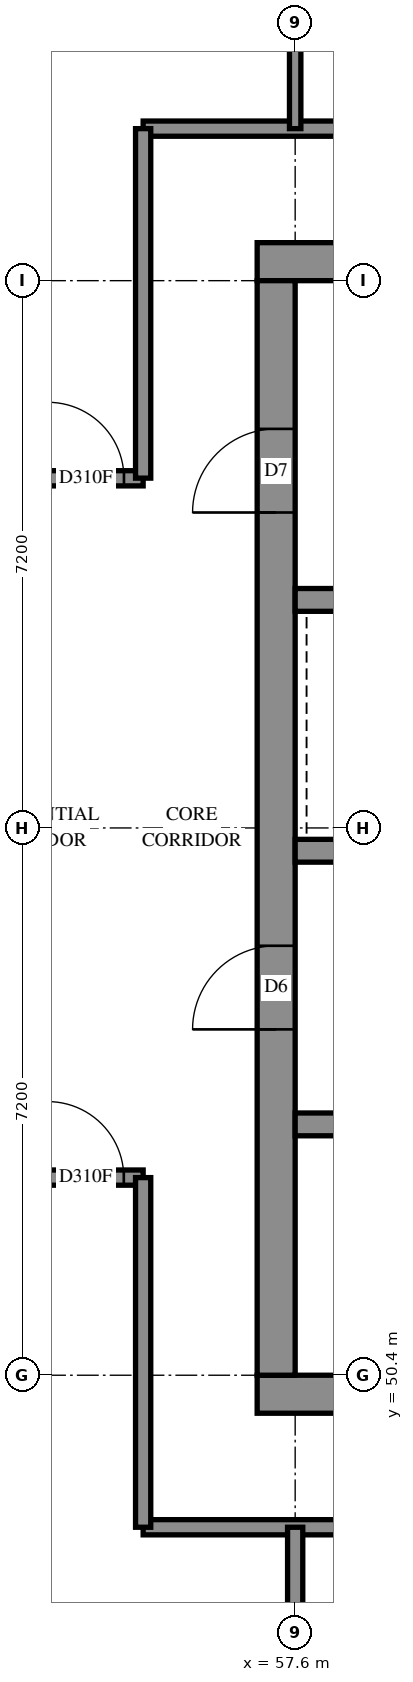
"""IFC4 building model, lengths in metres.
Left out: names, types, materials, properties, quantities, classifications, styles, units other than length and angle.
Written with IfcOpenShell. Run it as: python <this file> out.ifc"""

import sys

from ifc_helpers import new_model, si_unit, direction, frame, frame_2d, origin, place, context, subcontext, project, spatial, rectangle, extrude, element, fill, save


model = new_model("IFC4")
c1 = context("Model", 3, precision=1e-05, world=origin(), true_north=direction((0.0, 1.0)))
c2 = subcontext(c1, "Body", "Model", "MODEL_VIEW")
j1 = project(units=[si_unit("LENGTHUNIT", "METRE"), si_unit("PLANEANGLEUNIT", "RADIAN")], contexts=[c1])
p1 = place(None, origin())
s1 = spatial("IfcSite", under=j1, at=p1, CompositionType="ELEMENT")
p2 = place(p1, origin())
s2 = spatial("IfcBuilding", under=s1, at=p2, CompositionType="ELEMENT")
p3 = place(p2, frame((0.0, 0.0, 213.4)))
s3 = spatial("IfcBuildingStorey", under=s2, at=p3, CompositionType="ELEMENT", Elevation=213.4)
p4 = place(p3, frame((57.1, 50.15, -0.3), z_axis=(0.0, 0.0, 1.0), x_axis=(1.0, 0.0, 0.0)))
e1 = element("IfcWall", 1, at=p4, inside=s3, PredefinedType="SHEAR", context=c2, shape_type="SweptSolid", body=[
    extrude(rectangle(XDim=15.4, YDim=0.5, at=frame_2d((7.7, 0.0))), origin(), (0.0, 0.0, 1.0), 2.7),
])
p5 = place(p3, frame((57.1, 65.05, -0.3), z_axis=(0.0, 0.0, 1.0), x_axis=(1.0, 0.0, 0.0)))
e2 = element("IfcWall", 2, at=p5, inside=s3, PredefinedType="SHEAR", context=c2, shape_type="SweptSolid", body=[
    extrude(rectangle(XDim=15.4, YDim=0.5, at=frame_2d((7.7, 0.0))), origin(), (0.0, 0.0, 1.0), 2.7),
])
p6 = place(p5, frame((10.5, 0.0, 0.3)))
e3 = element("IfcOpeningElement", 3, at=p6, cuts=e2, PredefinedType="OPENING", context=c2, shape_type="SweptSolid", body=[
    extrude(rectangle(XDim=0.8, YDim=2.1, at=frame_2d((0.4, 1.05))), frame((0.0, 0.26, 0.0), z_axis=(0.0, -1.0, 0.0), x_axis=(1.0, 0.0, 0.0)), (0.0, 0.0, 1.0), 0.52),
])
p7 = place(p3, frame((57.35, 50.4, -0.3), z_axis=(0.0, 0.0, 1.0), x_axis=(0.0, 1.0, 0.0)))
e4 = element("IfcWall", 4, at=p7, inside=s3, PredefinedType="SHEAR", context=c2, shape_type="SweptSolid", body=[
    extrude(rectangle(XDim=14.4, YDim=0.5, at=frame_2d((7.2, 0.0))), origin(), (0.0, 0.0, 1.0), 2.7),
])
p8 = place(p7, frame((4.55, 0.0, 0.3)))
e5 = element("IfcOpeningElement", 5, at=p8, cuts=e4, PredefinedType="OPENING", context=c2, shape_type="SweptSolid", body=[
    extrude(rectangle(XDim=1.1, YDim=2.1, at=frame_2d((0.55, 1.05))), frame((0.0, 0.26, 0.0), z_axis=(0.0, -1.0, 0.0), x_axis=(1.0, 0.0, 0.0)), (0.0, 0.0, 1.0), 0.52),
])
p9 = place(p7, frame((11.35, 0.0, 0.3)))
e6 = element("IfcOpeningElement", 6, at=p9, cuts=e4, PredefinedType="OPENING", context=c2, shape_type="SweptSolid", body=[
    extrude(rectangle(XDim=1.1, YDim=2.1, at=frame_2d((0.55, 1.05))), frame((0.0, 0.26, 0.0), z_axis=(0.0, -1.0, 0.0), x_axis=(1.0, 0.0, 0.0)), (0.0, 0.0, 1.0), 0.52),
])
p10 = place(p3, frame((57.6, 53.7, 0.0), z_axis=(0.0, 0.0, 1.0), x_axis=(1.0, 0.0, 0.0)))
e7 = element("IfcWall", 7, at=p10, inside=s3, PredefinedType="SOLIDWALL", context=c2, shape_type="SweptSolid", body=[
    extrude(rectangle(XDim=14.4, YDim=0.3, at=frame_2d((7.2, 0.0))), origin(), (0.0, 0.0, 1.0), 3.1),
])
p11 = place(p10, frame((1.35, 0.0, 0.0)))
e8 = element("IfcOpeningElement", 8, at=p11, cuts=e7, PredefinedType="OPENING", context=c2, shape_type="SweptSolid", body=[
    extrude(rectangle(XDim=0.9, YDim=2.1, at=frame_2d((0.45, 1.05))), frame((0.0, 0.16, 0.0), z_axis=(0.0, -1.0, 0.0), x_axis=(1.0, 0.0, 0.0)), (0.0, 0.0, 1.0), 0.32),
])
p12 = place(p10, frame((4.95, 0.0, 0.0)))
e9 = element("IfcOpeningElement", 9, at=p12, cuts=e7, PredefinedType="OPENING", context=c2, shape_type="SweptSolid", body=[
    extrude(rectangle(XDim=0.9, YDim=2.1, at=frame_2d((0.45, 1.05))), frame((0.0, 0.16, 0.0), z_axis=(0.0, -1.0, 0.0), x_axis=(1.0, 0.0, 0.0)), (0.0, 0.0, 1.0), 0.32),
])
p13 = place(p10, frame((8.55, 0.0, 0.0)))
e10 = element("IfcOpeningElement", 10, at=p13, cuts=e7, PredefinedType="OPENING", context=c2, shape_type="SweptSolid", body=[
    extrude(rectangle(XDim=0.9, YDim=2.1, at=frame_2d((0.45, 1.05))), frame((0.0, 0.16, 0.0), z_axis=(0.0, -1.0, 0.0), x_axis=(1.0, 0.0, 0.0)), (0.0, 0.0, 1.0), 0.32),
])
p14 = place(p10, frame((12.05, 0.0, 0.0)))
e11 = element("IfcOpeningElement", 11, at=p14, cuts=e7, PredefinedType="OPENING", context=c2, shape_type="SweptSolid", body=[
    extrude(rectangle(XDim=1.1, YDim=2.1, at=frame_2d((0.55, 1.05))), frame((0.0, 0.16, 0.0), z_axis=(0.0, -1.0, 0.0), x_axis=(1.0, 0.0, 0.0)), (0.0, 0.0, 1.0), 0.32),
])
p15 = place(p3, frame((57.6, 57.3, 0.0), z_axis=(0.0, 0.0, 1.0), x_axis=(1.0, 0.0, 0.0)))
e12 = element("IfcWall", 12, at=p15, inside=s3, PredefinedType="SOLIDWALL", context=c2, shape_type="SweptSolid", body=[
    extrude(rectangle(XDim=14.4, YDim=0.3, at=frame_2d((7.2, 0.0))), origin(), (0.0, 0.0, 1.0), 3.1),
])
p16 = place(p15, frame((1.25, 0.0, 0.0)))
e13 = element("IfcOpeningElement", 13, at=p16, cuts=e12, PredefinedType="OPENING", context=c2, shape_type="SweptSolid", body=[
    extrude(rectangle(XDim=1.1, YDim=2.1, at=frame_2d((0.55, 1.05))), frame((0.0, 0.16, 0.0), z_axis=(0.0, -1.0, 0.0), x_axis=(1.0, 0.0, 0.0)), (0.0, 0.0, 1.0), 0.32),
])
p17 = place(p15, frame((4.85, 0.0, 0.0)))
e14 = element("IfcOpeningElement", 14, at=p17, cuts=e12, PredefinedType="OPENING", context=c2, shape_type="SweptSolid", body=[
    extrude(rectangle(XDim=1.1, YDim=2.1, at=frame_2d((0.55, 1.05))), frame((0.0, 0.16, 0.0), z_axis=(0.0, -1.0, 0.0), x_axis=(1.0, 0.0, 0.0)), (0.0, 0.0, 1.0), 0.32),
])
p18 = place(p15, frame((8.45, 0.0, 0.0)))
e15 = element("IfcOpeningElement", 15, at=p18, cuts=e12, PredefinedType="OPENING", context=c2, shape_type="SweptSolid", body=[
    extrude(rectangle(XDim=1.1, YDim=2.1, at=frame_2d((0.55, 1.05))), frame((0.0, 0.16, 0.0), z_axis=(0.0, -1.0, 0.0), x_axis=(1.0, 0.0, 0.0)), (0.0, 0.0, 1.0), 0.32),
])
p19 = place(p15, frame((12.05, 0.0, 0.0)))
e16 = element("IfcOpeningElement", 16, at=p19, cuts=e12, PredefinedType="OPENING", context=c2, shape_type="SweptSolid", body=[
    extrude(rectangle(XDim=1.1, YDim=2.1, at=frame_2d((0.55, 1.05))), frame((0.0, 0.16, 0.0), z_axis=(0.0, -1.0, 0.0), x_axis=(1.0, 0.0, 0.0)), (0.0, 0.0, 1.0), 0.32),
])
p20 = place(p3, frame((57.6, 60.6, 0.0), z_axis=(0.0, 0.0, 1.0), x_axis=(1.0, 0.0, 0.0)))
e17 = element("IfcWall", 17, at=p20, inside=s3, PredefinedType="SOLIDWALL", context=c2, shape_type="SweptSolid", body=[
    extrude(rectangle(XDim=7.2, YDim=0.3, at=frame_2d((3.6, 0.0))), origin(), (0.0, 0.0, 1.0), 3.1),
])
p21 = place(p3, frame((55.6, 48.4, 0.0), z_axis=(0.0, 0.0, 1.0), x_axis=(1.0, 0.0, 0.0)))
e18 = element("IfcWall", 18, at=p21, inside=s3, PredefinedType="PARTITIONING", context=c2, shape_type="SweptSolid", body=[
    extrude(rectangle(XDim=18.4, YDim=0.2, at=frame_2d((9.2, 0.0))), origin(), (0.0, 0.0, 1.0), 3.1),
])
p22 = place(p21, frame((5.862, 0.0, 0.0)))
e19 = element("IfcOpeningElement", 19, at=p22, cuts=e18, PredefinedType="OPENING", context=c2, shape_type="SweptSolid", body=[
    extrude(rectangle(XDim=1.0, YDim=2.1, at=frame_2d((0.5, 1.05))), frame((0.0, 0.11, 0.0), z_axis=(0.0, -1.0, 0.0), x_axis=(1.0, 0.0, 0.0)), (0.0, 0.0, 1.0), 0.22),
])
p23 = place(p21, frame((13.099, 0.0, 0.0)))
e20 = element("IfcOpeningElement", 20, at=p23, cuts=e18, PredefinedType="OPENING", context=c2, shape_type="SweptSolid", body=[
    extrude(rectangle(XDim=0.9, YDim=2.1, at=frame_2d((0.45, 1.05))), frame((0.0, 0.11, 0.0), z_axis=(0.0, -1.0, 0.0), x_axis=(1.0, 0.0, 0.0)), (0.0, 0.0, 1.0), 0.22),
])
p24 = place(p3, frame((55.6, 66.8, 0.0), z_axis=(0.0, 0.0, 1.0), x_axis=(1.0, 0.0, 0.0)))
e21 = element("IfcWall", 21, at=p24, inside=s3, PredefinedType="PARTITIONING", context=c2, shape_type="SweptSolid", body=[
    extrude(rectangle(XDim=18.4, YDim=0.2, at=frame_2d((9.2, 0.0))), origin(), (0.0, 0.0, 1.0), 3.1),
])
p25 = place(p24, frame((4.25, 0.0, 0.0)))
e22 = element("IfcOpeningElement", 22, at=p25, cuts=e21, PredefinedType="OPENING", context=c2, shape_type="SweptSolid", body=[
    extrude(rectangle(XDim=0.9, YDim=2.1, at=frame_2d((0.45, 1.05))), frame((0.0, 0.11, 0.0), z_axis=(0.0, -1.0, 0.0), x_axis=(1.0, 0.0, 0.0)), (0.0, 0.0, 1.0), 0.22),
])
p26 = place(p24, frame((7.974, 0.0, 0.0)))
e23 = element("IfcOpeningElement", 23, at=p26, cuts=e21, PredefinedType="OPENING", context=c2, shape_type="SweptSolid", body=[
    extrude(rectangle(XDim=1.0, YDim=2.1, at=frame_2d((0.5, 1.05))), frame((0.0, 0.11, 0.0), z_axis=(0.0, -1.0, 0.0), x_axis=(1.0, 0.0, 0.0)), (0.0, 0.0, 1.0), 0.22),
])
p27 = place(p24, frame((13.2, 0.0, 0.0)))
e24 = element("IfcOpeningElement", 24, at=p27, cuts=e21, PredefinedType="OPENING", context=c2, shape_type="SweptSolid", body=[
    extrude(rectangle(XDim=0.9, YDim=2.1, at=frame_2d((0.45, 1.05))), frame((0.0, 0.11, 0.0), z_axis=(0.0, -1.0, 0.0), x_axis=(1.0, 0.0, 0.0)), (0.0, 0.0, 1.0), 0.22),
])
p28 = place(p3, frame((40.602, 62.2, 0.0), z_axis=(0.0, 0.0, 1.0), x_axis=(1.0, 0.0, 0.0)))
e25 = element("IfcWall", 25, at=p28, inside=s3, PredefinedType="PARTITIONING", context=c2, shape_type="SweptSolid", body=[
    extrude(rectangle(XDim=14.998, YDim=0.2, at=frame_2d((7.499, 0.0))), origin(), (0.0, 0.0, 1.0), 3.1),
])
p29 = place(p28, frame((6.308, 0.0, 0.0)))
e26 = element("IfcOpeningElement", 26, at=p29, cuts=e25, PredefinedType="OPENING", context=c2, shape_type="SweptSolid", body=[
    extrude(rectangle(XDim=1.0, YDim=2.1, at=frame_2d((0.5, 1.05))), frame((0.0, 0.11, 0.0), z_axis=(0.0, -1.0, 0.0), x_axis=(1.0, 0.0, 0.0)), (0.0, 0.0, 1.0), 0.22),
])
p30 = place(p28, frame((9.928, 0.0, 0.0)))
e27 = element("IfcOpeningElement", 27, at=p30, cuts=e25, PredefinedType="OPENING", context=c2, shape_type="SweptSolid", body=[
    extrude(rectangle(XDim=0.9, YDim=2.1, at=frame_2d((0.45, 1.05))), frame((0.0, 0.11, 0.0), z_axis=(0.0, -1.0, 0.0), x_axis=(1.0, 0.0, 0.0)), (0.0, 0.0, 1.0), 0.22),
])
p31 = place(p28, frame((13.746, 0.0, 0.0)))
e28 = element("IfcOpeningElement", 28, at=p31, cuts=e25, PredefinedType="OPENING", context=c2, shape_type="SweptSolid", body=[
    extrude(rectangle(XDim=1.0, YDim=2.1, at=frame_2d((0.5, 1.05))), frame((0.0, 0.11, 0.0), z_axis=(0.0, -1.0, 0.0), x_axis=(1.0, 0.0, 0.0)), (0.0, 0.0, 1.0), 0.22),
])
p32 = place(p3, frame((50.4, 53.0, 0.0), z_axis=(0.0, 0.0, 1.0), x_axis=(1.0, 0.0, 0.0)))
e29 = element("IfcWall", 29, at=p32, inside=s3, PredefinedType="PARTITIONING", context=c2, shape_type="SweptSolid", body=[
    extrude(rectangle(XDim=5.2, YDim=0.2, at=frame_2d((2.6, 0.0))), origin(), (0.0, 0.0, 1.0), 3.1),
])
p33 = place(p32, frame((0.4, 0.0, 0.0)))
e30 = element("IfcOpeningElement", 30, at=p33, cuts=e29, PredefinedType="OPENING", context=c2, shape_type="SweptSolid", body=[
    extrude(rectangle(XDim=0.9, YDim=2.1, at=frame_2d((0.45, 1.05))), frame((0.0, 0.11, 0.0), z_axis=(0.0, -1.0, 0.0), x_axis=(1.0, 0.0, 0.0)), (0.0, 0.0, 1.0), 0.22),
])
p34 = place(p32, frame((3.946, 0.0, 0.0)))
e31 = element("IfcOpeningElement", 31, at=p34, cuts=e29, PredefinedType="OPENING", context=c2, shape_type="SweptSolid", body=[
    extrude(rectangle(XDim=1.0, YDim=2.1, at=frame_2d((0.5, 1.05))), frame((0.0, 0.11, 0.0), z_axis=(0.0, -1.0, 0.0), x_axis=(1.0, 0.0, 0.0)), (0.0, 0.0, 1.0), 0.22),
])
p35 = place(p3, frame((57.6, 43.6, 0.0), z_axis=(0.0, 0.0, 1.0), x_axis=(0.0, 1.0, 0.0)))
e32 = element("IfcWall", 32, at=p35, inside=s3, PredefinedType="PARTITIONING", context=c2, shape_type="SweptSolid", body=[
    extrude(rectangle(XDim=4.8, YDim=0.2, at=frame_2d((2.4, 0.0))), origin(), (0.0, 0.0, 1.0), 3.1),
])
p36 = place(p3, frame((55.6, 48.4, 0.0), z_axis=(0.0, 0.0, 1.0), x_axis=(0.0, 1.0, 0.0)))
e33 = element("IfcWall", 33, at=p36, inside=s3, PredefinedType="PARTITIONING", context=c2, shape_type="SweptSolid", body=[
    extrude(rectangle(XDim=4.6, YDim=0.2, at=frame_2d((2.3, 0.0))), origin(), (0.0, 0.0, 1.0), 3.1),
])
p37 = place(p3, frame((55.6, 62.202, 0.0), z_axis=(0.0, 0.0, 1.0), x_axis=(0.0, 1.0, 0.0)))
e34 = element("IfcWall", 34, at=p37, inside=s3, PredefinedType="PARTITIONING", context=c2, shape_type="SweptSolid", body=[
    extrude(rectangle(XDim=4.598, YDim=0.2, at=frame_2d((2.299, 0.0))), origin(), (0.0, 0.0, 1.0), 3.1),
])
p38 = place(p3, frame((57.6, 66.8, 0.0), z_axis=(0.0, 0.0, 1.0), x_axis=(0.0, 1.0, 0.0)))
e35 = element("IfcWall", 35, at=p38, inside=s3, PredefinedType="PARTITIONING", context=c2, shape_type="SweptSolid", body=[
    extrude(rectangle(XDim=2.4, YDim=0.15, at=frame_2d((1.2, 0.0))), origin(), (0.0, 0.0, 1.0), 3.1),
])
p39 = place(p8, origin())
e36 = element("IfcDoor", 36, at=p39, inside=s3, OperationType="DOUBLE_DOOR_SINGLE_SWING", PredefinedType="DOOR", context=c2, shape_type="SweptSolid", body=[
    extrude(rectangle(XDim=1.1, YDim=2.1, at=frame_2d((0.55, 1.05))), frame((0.0, 0.025, 0.0), z_axis=(0.0, -1.0, 0.0), x_axis=(1.0, 0.0, 0.0)), (0.0, 0.0, 1.0), 0.05),
])
fill(e5, e36)
p40 = place(p9, origin())
e37 = element("IfcDoor", 37, at=p40, inside=s3, OperationType="SINGLE_SWING_LEFT", PredefinedType="DOOR", context=c2, shape_type="SweptSolid", body=[
    extrude(rectangle(XDim=1.1, YDim=2.1, at=frame_2d((0.55, 1.05))), frame((0.0, 0.025, 0.0), z_axis=(0.0, -1.0, 0.0), x_axis=(1.0, 0.0, 0.0)), (0.0, 0.0, 1.0), 0.05),
])
fill(e6, e37)
p41 = place(p31, origin())
e38 = element("IfcDoor", 38, at=p41, inside=s3, OperationType="SINGLE_SWING_LEFT", PredefinedType="DOOR", context=c2, shape_type="SweptSolid", body=[
    extrude(rectangle(XDim=1.0, YDim=2.1, at=frame_2d((0.5, 1.05))), frame((0.0, 0.025, 0.0), z_axis=(0.0, -1.0, 0.0), x_axis=(1.0, 0.0, 0.0)), (0.0, 0.0, 1.0), 0.05),
])
fill(e28, e38)
p42 = place(p34, origin())
e39 = element("IfcDoor", 39, at=p42, inside=s3, OperationType="SINGLE_SWING_RIGHT", PredefinedType="DOOR", context=c2, shape_type="SweptSolid", body=[
    extrude(rectangle(XDim=1.0, YDim=2.1, at=frame_2d((0.5, 1.05))), frame((0.0, 0.025, 0.0), z_axis=(0.0, -1.0, 0.0), x_axis=(1.0, 0.0, 0.0)), (0.0, 0.0, 1.0), 0.05),
])
fill(e31, e39)
save(model, sys.argv[1])
